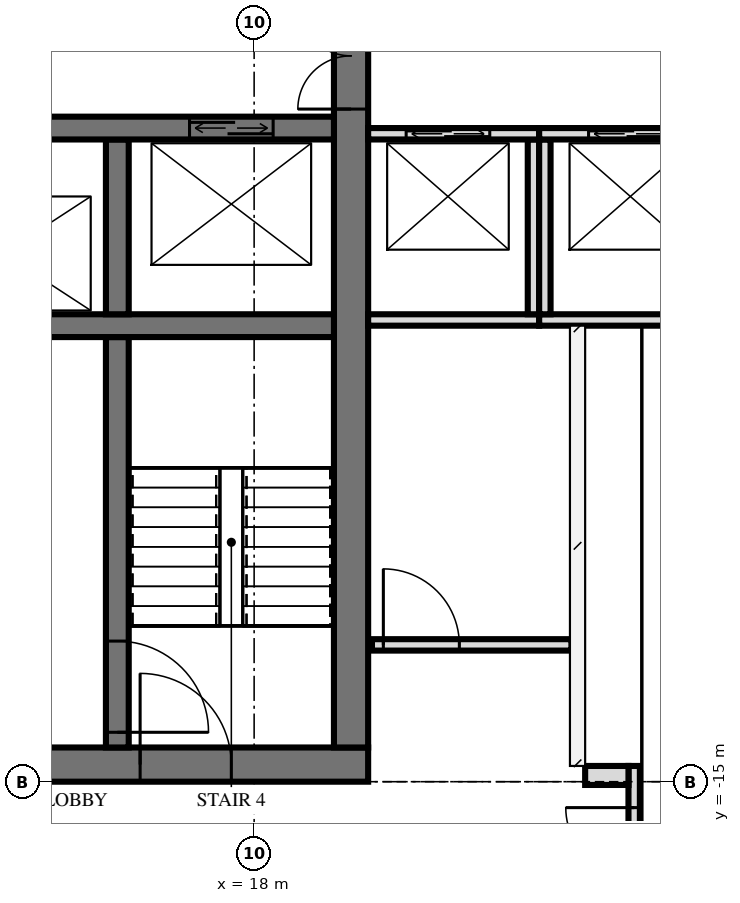
"""IFC4 building model, lengths in metres.
Left out: names, types, materials, properties, quantities, classifications, styles, units other than length and angle.
Written with IfcOpenShell. Run it as: python <this file> out.ifc"""

import sys

from ifc_helpers import new_model, si_unit, direction, frame, frame_2d, origin, place, context, subcontext, project, spatial, rectangle, extrude, element, fill, save


model = new_model("IFC4")
c1 = context("Model", 3, precision=1e-05, world=origin(), true_north=direction((0.0, 1.0)))
c2 = subcontext(c1, "Body", "Model", "MODEL_VIEW")
j1 = project(units=[si_unit("LENGTHUNIT", "METRE"), si_unit("PLANEANGLEUNIT", "RADIAN")], contexts=[c1])
p1 = place(None, origin())
s1 = spatial("IfcSite", under=j1, at=p1, CompositionType="ELEMENT")
p2 = place(p1, origin())
s2 = spatial("IfcBuilding", under=s1, at=p2, CompositionType="ELEMENT")
p3 = place(p2, frame((0.0, 0.0, 246.6)))
s3 = spatial("IfcBuildingStorey", under=s2, at=p3, CompositionType="ELEMENT", Elevation=246.6)
p4 = place(p3, frame((10.0, -14.775, 0.0), z_axis=(0.0, 0.0, 1.0), x_axis=(1.0, 0.0, 0.0)))
e1 = element("IfcWall", 1, at=p4, inside=s3, PredefinedType="SHEAR", context=c2, shape_type="SweptSolid", body=[
    extrude(rectangle(XDim=9.5, YDim=0.45, at=frame_2d((4.75, 0.0))), origin(), (0.0, 0.0, 1.0), 6.0),
])
p5 = place(p4, frame((6.5, 0.0, 0.0)))
e2 = element("IfcOpeningElement", 2, at=p5, cuts=e1, PredefinedType="OPENING", context=c2, shape_type="SweptSolid", body=[
    extrude(rectangle(XDim=1.2, YDim=2.1, at=frame_2d((0.6, 1.05))), frame((0.0, 0.235, 0.0), z_axis=(0.0, -1.0, 0.0), x_axis=(1.0, 0.0, 0.0)), (0.0, 0.0, 1.0), 0.47),
])
p6 = place(p4, frame((4.15, 0.0, 0.0)))
e3 = element("IfcOpeningElement", 3, at=p6, cuts=e1, PredefinedType="OPENING", context=c2, shape_type="SweptSolid", body=[
    extrude(rectangle(XDim=1.1, YDim=2.1, at=frame_2d((0.55, 1.05))), frame((0.0, 0.235, 0.0), z_axis=(0.0, -1.0, 0.0), x_axis=(1.0, 0.0, 0.0)), (0.0, 0.0, 1.0), 0.47),
])
p7 = place(p3, frame((19.275, -14.55, 0.0), z_axis=(0.0, 0.0, 1.0), x_axis=(0.0, 1.0, 0.0)))
e4 = element("IfcWall", 4, at=p7, inside=s3, PredefinedType="SHEAR", context=c2, shape_type="SweptSolid", body=[
    extrude(rectangle(XDim=14.1, YDim=0.45, at=frame_2d((7.05, 0.0))), origin(), (0.0, 0.0, 1.0), 6.0),
])
p8 = place(p7, frame((8.4, 0.0, 0.0)))
e5 = element("IfcOpeningElement", 5, at=p8, cuts=e4, PredefinedType="OPENING", context=c2, shape_type="SweptSolid", body=[
    extrude(rectangle(XDim=1.4, YDim=2.4, at=frame_2d((0.7, 1.2))), frame((0.0, 0.235, 0.0), z_axis=(0.0, -1.0, 0.0), x_axis=(1.0, 0.0, 0.0)), (0.0, 0.0, 1.0), 0.47),
])
p9 = place(p7, frame((10.0, 0.0, 0.0)))
e6 = element("IfcOpeningElement", 6, at=p9, cuts=e4, PredefinedType="OPENING", context=c2, shape_type="SweptSolid", body=[
    extrude(rectangle(XDim=1.4, YDim=2.4, at=frame_2d((0.7, 1.2))), frame((0.0, 0.235, 0.0), z_axis=(0.0, -1.0, 0.0), x_axis=(1.0, 0.0, 0.0)), (0.0, 0.0, 1.0), 0.47),
])
p10 = place(p3, frame((10.35, -6.4, 0.0), z_axis=(0.0, 0.0, 1.0), x_axis=(1.0, 0.0, 0.0)))
e7 = element("IfcWall", 7, at=p10, inside=s3, PredefinedType="SHEAR", context=c2, shape_type="SweptSolid", body=[
    extrude(rectangle(XDim=8.7, YDim=0.3, at=frame_2d((4.35, 0.0))), origin(), (0.0, 0.0, 1.0), 6.0),
])
p11 = place(p10, frame((6.8, 0.0, 0.0)))
e8 = element("IfcOpeningElement", 8, at=p11, cuts=e7, PredefinedType="OPENING", context=c2, shape_type="SweptSolid", body=[
    extrude(rectangle(XDim=1.1, YDim=2.1, at=frame_2d((0.55, 1.05))), frame((0.0, 0.16, 0.0), z_axis=(0.0, -1.0, 0.0), x_axis=(1.0, 0.0, 0.0)), (0.0, 0.0, 1.0), 0.32),
])
p12 = place(p3, frame((10.35, -9.0, 0.0), z_axis=(0.0, 0.0, 1.0), x_axis=(1.0, 0.0, 0.0)))
e9 = element("IfcWall", 9, at=p12, inside=s3, PredefinedType="SHEAR", context=c2, shape_type="SweptSolid", body=[
    extrude(rectangle(XDim=8.7, YDim=0.3, at=frame_2d((4.35, 0.0))), origin(), (0.0, 0.0, 1.0), 6.0),
])
p13 = place(p12, frame((3.8, 0.0, 0.0)))
e10 = element("IfcOpeningElement", 10, at=p13, cuts=e9, PredefinedType="OPENING", context=c2, shape_type="SweptSolid", body=[
    extrude(rectangle(XDim=1.1, YDim=2.1, at=frame_2d((0.55, 1.05))), frame((0.0, 0.16, 0.0), z_axis=(0.0, -1.0, 0.0), x_axis=(1.0, 0.0, 0.0)), (0.0, 0.0, 1.0), 0.32),
])
p14 = place(p3, frame((16.2, -8.85, 0.0), z_axis=(0.0, 0.0, 1.0), x_axis=(0.0, 1.0, 0.0)))
e11 = element("IfcWall", 11, at=p14, inside=s3, PredefinedType="SHEAR", context=c2, shape_type="SweptSolid", body=[
    extrude(rectangle(XDim=2.3, YDim=0.3, at=frame_2d((1.15, 0.0))), origin(), (0.0, 0.0, 1.0), 6.0),
])
p15 = place(p3, frame((16.2, -14.55, 0.0), z_axis=(0.0, 0.0, 1.0), x_axis=(0.0, 1.0, 0.0)))
e12 = element("IfcWall", 12, at=p15, inside=s3, PredefinedType="SHEAR", context=c2, shape_type="SweptSolid", body=[
    extrude(rectangle(XDim=5.4, YDim=0.3, at=frame_2d((2.7, 0.0))), origin(), (0.0, 0.0, 1.0), 6.0),
])
p16 = place(p15, frame((0.2, 0.0, 0.0)))
e13 = element("IfcOpeningElement", 13, at=p16, cuts=e12, PredefinedType="OPENING", context=c2, shape_type="SweptSolid", body=[
    extrude(rectangle(XDim=1.2, YDim=2.1, at=frame_2d((0.6, 1.05))), frame((0.0, 0.16, 0.0), z_axis=(0.0, -1.0, 0.0), x_axis=(1.0, 0.0, 0.0)), (0.0, 0.0, 1.0), 0.32),
])
p17 = place(p3, frame((22.355, -14.918, 0.0), z_axis=(0.0, 0.0, 1.0), x_axis=(1.0, 0.0, 0.0)))
e14 = element("IfcWall", 14, at=p17, inside=s3, PredefinedType="SOLIDWALL", context=c2, shape_type="SweptSolid", body=[
    extrude(rectangle(XDim=0.57, YDim=0.25, at=frame_2d((0.285, 0.0))), origin(), (0.0, 0.0, 1.0), 4.72),
])
p18 = place(p3, frame((23.0, -17.689, 0.0), z_axis=(0.0, 0.0, 1.0), x_axis=(0.0, 1.0, 0.0)))
e15 = element("IfcWall", 15, at=p18, inside=s3, PredefinedType="USERDEFINED", context=c2, shape_type="SweptSolid", body=[
    extrude(rectangle(XDim=2.896, YDim=0.15, at=frame_2d((1.448, 0.0))), origin(), (0.0, 0.0, 1.0), 5.72),
])
p19 = place(p18, frame((0.548, 0.0, 0.0)))
e16 = element("IfcOpeningElement", 16, at=p19, cuts=e15, PredefinedType="OPENING", context=c2, shape_type="SweptSolid", body=[
    extrude(rectangle(XDim=1.8, YDim=2.4, at=frame_2d((0.9, 1.2))), frame((0.0, 0.085, 0.0), z_axis=(0.0, -1.0, 0.0), x_axis=(1.0, 0.0, 0.0)), (0.0, 0.0, 1.0), 0.17),
])
p20 = place(p3, frame((19.5, -8.925, 0.0), z_axis=(0.0, 0.0, 1.0), x_axis=(1.0, 0.0, 0.0)))
e17 = element("IfcWall", 17, at=p20, inside=s3, PredefinedType="PARTITIONING", context=c2, shape_type="SweptSolid", body=[
    extrude(rectangle(XDim=2.25, YDim=0.15, at=frame_2d((1.125, 0.0))), origin(), (0.0, 0.0, 1.0), 5.2),
])
p21 = place(p3, frame((19.5, -6.475, 0.0), z_axis=(0.0, 0.0, 1.0), x_axis=(1.0, 0.0, 0.0)))
e18 = element("IfcWall", 18, at=p21, inside=s3, PredefinedType="PARTITIONING", context=c2, shape_type="SweptSolid", body=[
    extrude(rectangle(XDim=2.25, YDim=0.15, at=frame_2d((1.125, 0.0))), origin(), (0.0, 0.0, 1.0), 5.2),
])
p22 = place(p21, frame((0.5, 0.0, 0.0)))
e19 = element("IfcOpeningElement", 19, at=p22, cuts=e18, PredefinedType="OPENING", context=c2, shape_type="SweptSolid", body=[
    extrude(rectangle(XDim=1.1, YDim=2.1, at=frame_2d((0.55, 1.05))), frame((0.0, 0.085, 0.0), z_axis=(0.0, -1.0, 0.0), x_axis=(1.0, 0.0, 0.0)), (0.0, 0.0, 1.0), 0.17),
])
p23 = place(p3, frame((21.675, -8.85, 0.0), z_axis=(0.0, 0.0, 1.0), x_axis=(0.0, 1.0, 0.0)))
e20 = element("IfcWall", 20, at=p23, inside=s3, PredefinedType="PARTITIONING", context=c2, shape_type="SweptSolid", body=[
    extrude(rectangle(XDim=2.3, YDim=0.15, at=frame_2d((1.15, 0.0))), origin(), (0.0, 0.0, 1.0), 5.2),
])
p24 = place(p3, frame((21.75, -8.925, 0.0), z_axis=(0.0, 0.0, 1.0), x_axis=(1.0, 0.0, 0.0)))
e21 = element("IfcWall", 21, at=p24, inside=s3, PredefinedType="PARTITIONING", context=c2, shape_type="SweptSolid", body=[
    extrude(rectangle(XDim=2.4, YDim=0.15, at=frame_2d((1.2, 0.0))), origin(), (0.0, 0.0, 1.0), 5.72),
])
p25 = place(p3, frame((21.75, -6.475, 0.0), z_axis=(0.0, 0.0, 1.0), x_axis=(1.0, 0.0, 0.0)))
e22 = element("IfcWall", 22, at=p25, inside=s3, PredefinedType="PARTITIONING", context=c2, shape_type="SweptSolid", body=[
    extrude(rectangle(XDim=2.4, YDim=0.15, at=frame_2d((1.2, 0.0))), origin(), (0.0, 0.0, 1.0), 4.6),
])
p26 = place(p25, frame((0.65, 0.0, 0.0)))
e23 = element("IfcOpeningElement", 23, at=p26, cuts=e22, PredefinedType="OPENING", context=c2, shape_type="SweptSolid", body=[
    extrude(rectangle(XDim=1.1, YDim=2.1, at=frame_2d((0.55, 1.05))), frame((0.0, 0.085, 0.0), z_axis=(0.0, -1.0, 0.0), x_axis=(1.0, 0.0, 0.0)), (0.0, 0.0, 1.0), 0.17),
])
p27 = place(p3, frame((21.825, -8.85, 0.0), z_axis=(0.0, 0.0, 1.0), x_axis=(0.0, 1.0, 0.0)))
e24 = element("IfcWall", 24, at=p27, inside=s3, PredefinedType="PARTITIONING", context=c2, shape_type="SweptSolid", body=[
    extrude(rectangle(XDim=2.3, YDim=0.15, at=frame_2d((1.15, 0.0))), origin(), (0.0, 0.0, 1.0), 4.6),
])
p28 = place(p3, frame((19.55, -13.2, 0.0), z_axis=(0.0, 0.0, 1.0), x_axis=(1.0, 0.0, 0.0)))
e25 = element("IfcWall", 25, at=p28, inside=s3, PredefinedType="PARTITIONING", context=c2, shape_type="SweptSolid", body=[
    extrude(rectangle(XDim=2.625, YDim=0.15, at=frame_2d((1.312, 0.0))), origin(), (0.0, 0.0, 1.0), 5.7),
])
p29 = place(p28, frame((0.15, 0.0, 0.0)))
e26 = element("IfcOpeningElement", 26, at=p29, cuts=e25, PredefinedType="OPENING", context=c2, shape_type="SweptSolid", body=[
    extrude(rectangle(XDim=1.0, YDim=2.1, at=frame_2d((0.5, 1.05))), frame((0.0, 0.085, 0.0), z_axis=(0.0, -1.0, 0.0), x_axis=(1.0, 0.0, 0.0)), (0.0, 0.0, 1.0), 0.17),
])
p30 = place(p19, origin())
e27 = element("IfcDoor", 27, at=p30, inside=s3, OperationType="DOUBLE_DOOR_SINGLE_SWING", PredefinedType="DOOR", context=c2, shape_type="SweptSolid", body=[
    extrude(rectangle(XDim=1.8, YDim=2.4, at=frame_2d((0.9, 1.2))), frame((0.0, 0.025, 0.0), z_axis=(0.0, -1.0, 0.0), x_axis=(1.0, 0.0, 0.0)), (0.0, 0.0, 1.0), 0.05),
])
fill(e16, e27)
p31 = place(p22, origin())
e28 = element("IfcDoor", 28, at=p31, inside=s3, OperationType="DOUBLE_DOOR_SLIDING", PredefinedType="USERDEFINED", context=c2, shape_type="SweptSolid", body=[
    extrude(rectangle(XDim=1.1, YDim=2.1, at=frame_2d((0.55, 1.05))), frame((0.0, 0.025, 0.0), z_axis=(0.0, -1.0, 0.0), x_axis=(1.0, 0.0, 0.0)), (0.0, 0.0, 1.0), 0.05),
])
fill(e19, e28)
p32 = place(p26, origin())
e29 = element("IfcDoor", 29, at=p32, inside=s3, OperationType="DOUBLE_DOOR_SLIDING", PredefinedType="USERDEFINED", context=c2, shape_type="SweptSolid", body=[
    extrude(rectangle(XDim=1.1, YDim=2.1, at=frame_2d((0.55, 1.05))), frame((0.0, 0.025, 0.0), z_axis=(0.0, -1.0, 0.0), x_axis=(1.0, 0.0, 0.0)), (0.0, 0.0, 1.0), 0.05),
])
fill(e23, e29)
p33 = place(p11, origin())
e30 = element("IfcDoor", 30, at=p33, inside=s3, OperationType="DOUBLE_DOOR_SLIDING", PredefinedType="USERDEFINED", context=c2, shape_type="SweptSolid", body=[
    extrude(rectangle(XDim=1.1, YDim=2.1, at=frame_2d((0.55, 1.05))), frame((0.0, 0.025, 0.0), z_axis=(0.0, -1.0, 0.0), x_axis=(1.0, 0.0, 0.0)), (0.0, 0.0, 1.0), 0.05),
])
fill(e8, e30)
p34 = place(p8, origin())
e31 = element("IfcDoor", 31, at=p34, inside=s3, OperationType="DOUBLE_DOOR_SINGLE_SWING", PredefinedType="DOOR", context=c2, shape_type="SweptSolid", body=[
    extrude(rectangle(XDim=1.4, YDim=2.4, at=frame_2d((0.7, 1.2))), frame((0.0, 0.025, 0.0), z_axis=(0.0, -1.0, 0.0), x_axis=(1.0, 0.0, 0.0)), (0.0, 0.0, 1.0), 0.05),
])
fill(e5, e31)
p35 = place(p5, origin())
e32 = element("IfcDoor", 32, at=p35, inside=s3, OperationType="SINGLE_SWING_RIGHT", PredefinedType="DOOR", context=c2, shape_type="SweptSolid", body=[
    extrude(rectangle(XDim=1.2, YDim=2.1, at=frame_2d((0.6, 1.05))), frame((0.0, 0.025, 0.0), z_axis=(0.0, -1.0, 0.0), x_axis=(1.0, 0.0, 0.0)), (0.0, 0.0, 1.0), 0.05),
])
fill(e2, e32)
p36 = place(p16, frame((0.6, 0.0, 0.0), z_axis=(0.0, 0.0, 1.0), x_axis=(-1.0, 0.0, 0.0)))
e33 = element("IfcDoor", 33, at=p36, inside=s3, OperationType="SINGLE_SWING_LEFT", PredefinedType="DOOR", context=c2, shape_type="SweptSolid", body=[
    extrude(rectangle(XDim=1.2, YDim=2.1, at=frame_2d((0.0, 1.05))), frame((0.0, -0.025, 0.0), z_axis=(0.0, 1.0, 0.0), x_axis=(-1.0, 0.0, 0.0)), (0.0, 0.0, 1.0), 0.05),
])
fill(e13, e33)
p37 = place(p29, origin())
e34 = element("IfcDoor", 34, at=p37, inside=s3, OperationType="SINGLE_SWING_RIGHT", PredefinedType="DOOR", context=c2, shape_type="SweptSolid", body=[
    extrude(rectangle(XDim=1.0, YDim=2.1, at=frame_2d((0.5, 1.05))), frame((0.0, 0.025, 0.0), z_axis=(0.0, -1.0, 0.0), x_axis=(1.0, 0.0, 0.0)), (0.0, 0.0, 1.0), 0.05),
])
fill(e26, e34)
save(model, sys.argv[1])
